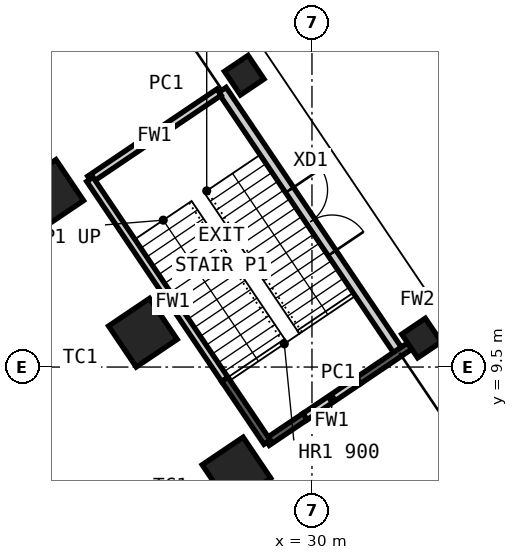
"""IFC4 building model, lengths in metres.
Left out: names, types, materials, properties, quantities, classifications, styles, units other than length and angle.
Written with IfcOpenShell. Run it as: python <this file> out.ifc"""

import sys

from ifc_helpers import new_model, si_unit, direction, frame, frame_2d, origin, origin_2d, place, context, subcontext, project, spatial, rectangle, hollow_rectangle, extrude, element, fill, save


model = new_model("IFC4")
c1 = context("Model", 3, precision=1e-05, world=origin(), true_north=direction((0.0, 1.0)))
c2 = subcontext(c1, "Body", "Model", "MODEL_VIEW")
j1 = project(units=[si_unit("LENGTHUNIT", "METRE"), si_unit("PLANEANGLEUNIT", "RADIAN")], contexts=[c1])
p1 = place(None, origin())
s1 = spatial("IfcSite", under=j1, at=p1, CompositionType="ELEMENT")
p2 = place(p1, origin())
s2 = spatial("IfcBuilding", under=s1, at=p2, CompositionType="ELEMENT")
p3 = place(p2, origin())
s3 = spatial("IfcBuildingStorey", under=s2, at=p3, CompositionType="ELEMENT", Elevation=0.0)
for number, where, z_axis, x_axis in (
    (1, (23.087, 14.056, 0.0), (0.0, 0.0, 1.0), (-0.559, 0.829, 0.0)),
    (2, (25.55, 10.404, 0.0), (0.0, 0.0, 1.0), (-0.559, 0.829, 0.0)),
    (3, (28.013, 6.752, 0.0), (0.0, 0.0, 1.0), (-0.559, 0.829, 0.0)),
):
    element("IfcColumn", number, at=place(p3, frame(where, z_axis=z_axis, x_axis=x_axis)), inside=s3, PredefinedType="COLUMN", context=c2, shape_type="SweptSolid", body=[
        extrude(hollow_rectangle(XDim=1.3, YDim=1.3, WallThickness=0.1, at=origin_2d()), origin(), (0.0, 0.0, 1.0), 6.0),
    ])
for number, where, z_axis, x_axis in (
    (4, (28.218, 17.179, 0.0), (0.0, 0.0, 1.0), (-0.559, 0.829, 0.0)),
    (5, (32.883, 10.263, 0.0), (0.0, 0.0, 1.0), (-0.559, 0.829, 0.0)),
):
    element("IfcColumn", number, at=place(p3, frame(where, z_axis=z_axis, x_axis=x_axis)), inside=s3, PredefinedType="COLUMN", context=c2, shape_type="SweptSolid", body=[
        extrude(hollow_rectangle(XDim=0.75, YDim=0.75, WallThickness=0.036, at=origin_2d()), origin(), (0.0, 0.0, 1.0), 6.0),
    ])
p4 = place(p3, frame((27.637, 16.788, 0.0), z_axis=(0.0, 0.0, 1.0), x_axis=(0.559196871021, -0.829034896395, 0.0)))
e6 = element("IfcWall", 6, at=p4, inside=s3, PredefinedType="SOLIDWALL", context=c2, shape_type="SweptSolid", body=[
    extrude(rectangle(XDim=8.342, YDim=0.25, at=frame_2d((4.171, 0.0))), origin(), (0.0, 0.0, 1.0), 5.75),
])
p5 = place(p4, frame((3.171, 0.0, 0.0)))
e7 = element("IfcOpeningElement", 7, at=p5, cuts=e6, PredefinedType="OPENING", context=c2, shape_type="SweptSolid", body=[
    extrude(rectangle(XDim=2.0, YDim=2.4, at=frame_2d((1.0, 1.2))), frame((0.0, 0.135, 0.0), z_axis=(0.0, -1.0, 0.0), x_axis=(1.0, 0.0, 0.0)), (0.0, 0.0, 1.0), 0.27),
])
p6 = place(p3, frame((27.555, 16.732, 0.0), z_axis=(0.0, 0.0, 1.0), x_axis=(-0.829042598749, -0.55918545176, 0.0)))
e8 = element("IfcWall", 8, at=p6, inside=s3, PredefinedType="PARTITIONING", context=c2, shape_type="SweptSolid", body=[
    extrude(rectangle(XDim=4.1, YDim=0.2, at=frame_2d((2.05, 0.0))), origin(), (0.0, 0.0, 1.0), 5.75),
])
p7 = place(p3, frame((32.572, 10.054, 0.0), z_axis=(0.0, 0.0, 1.0), x_axis=(-0.829033253898, -0.55919930609, 0.0)))
e9 = element("IfcWall", 9, at=p7, inside=s3, PredefinedType="PARTITIONING", context=c2, shape_type="SweptSolid", body=[
    extrude(rectangle(XDim=1.625, YDim=0.2, at=frame_2d((0.812, 0.0))), origin(), (0.0, 0.0, 1.0), 5.75),
])
p8 = place(p3, frame((24.156, 14.439, 0.0), z_axis=(0.0, 0.0, 1.0), x_axis=(0.559181615952, -0.829045185971, 0.0)))
e10 = element("IfcWall", 10, at=p8, inside=s3, PredefinedType="PARTITIONING", context=c2, shape_type="SweptSolid", body=[
    extrude(rectangle(XDim=6.35, YDim=0.2, at=frame_2d((3.175, 0.0))), origin(), (0.0, 0.0, 1.0), 5.75),
])
p9 = place(p3, frame((31.224, 9.145, 0.0), z_axis=(0.0, 0.0, 1.0), x_axis=(-0.829033422808, -0.559199055675, 0.0)))
e11 = element("IfcWall", 11, at=p9, inside=s3, PredefinedType="PARTITIONING", context=c2, shape_type="SweptSolid", body=[
    extrude(rectangle(XDim=1.7, YDim=0.2, at=frame_2d((0.85, 0.0))), origin(), (0.0, 0.0, 1.0), 5.75),
])
p10 = place(p3, frame((29.815, 8.194, 0.0), z_axis=(0.0, 0.0, 1.0), x_axis=(-0.829096255744, -0.559105892217, 0.0)))
e12 = element("IfcWall", 12, at=p10, inside=s3, PredefinedType="PARTITIONING", context=c2, shape_type="SweptSolid", body=[
    extrude(rectangle(XDim=1.2, YDim=0.2, at=frame_2d((0.6, 0.0))), origin(), (0.0, 0.0, 1.0), 5.75),
])
p11 = place(p3, frame((27.706, 9.175, 0.0), z_axis=(0.0, 0.0, 1.0), x_axis=(0.559218085846, -0.829020586272, 0.0)))
e13 = element("IfcWall", 13, at=p11, inside=s3, PredefinedType="PARTITIONING", context=c2, shape_type="SweptSolid", body=[
    extrude(rectangle(XDim=1.992, YDim=0.2, at=frame_2d((0.996, 0.0))), origin(), (0.0, 0.0, 1.0), 5.75),
])
p12 = place(p5, origin())
e14 = element("IfcDoor", 14, at=p12, inside=s3, OperationType="DOUBLE_DOOR_DOUBLE_SWING", PredefinedType="DOOR", context=c2, shape_type="SweptSolid", body=[
    extrude(rectangle(XDim=2.0, YDim=2.4, at=frame_2d((1.0, 1.2))), frame((0.0, 0.025, 0.0), z_axis=(0.0, -1.0, 0.0), x_axis=(1.0, 0.0, 0.0)), (0.0, 0.0, 1.0), 0.05),
])
fill(e7, e14)
save(model, sys.argv[1])
